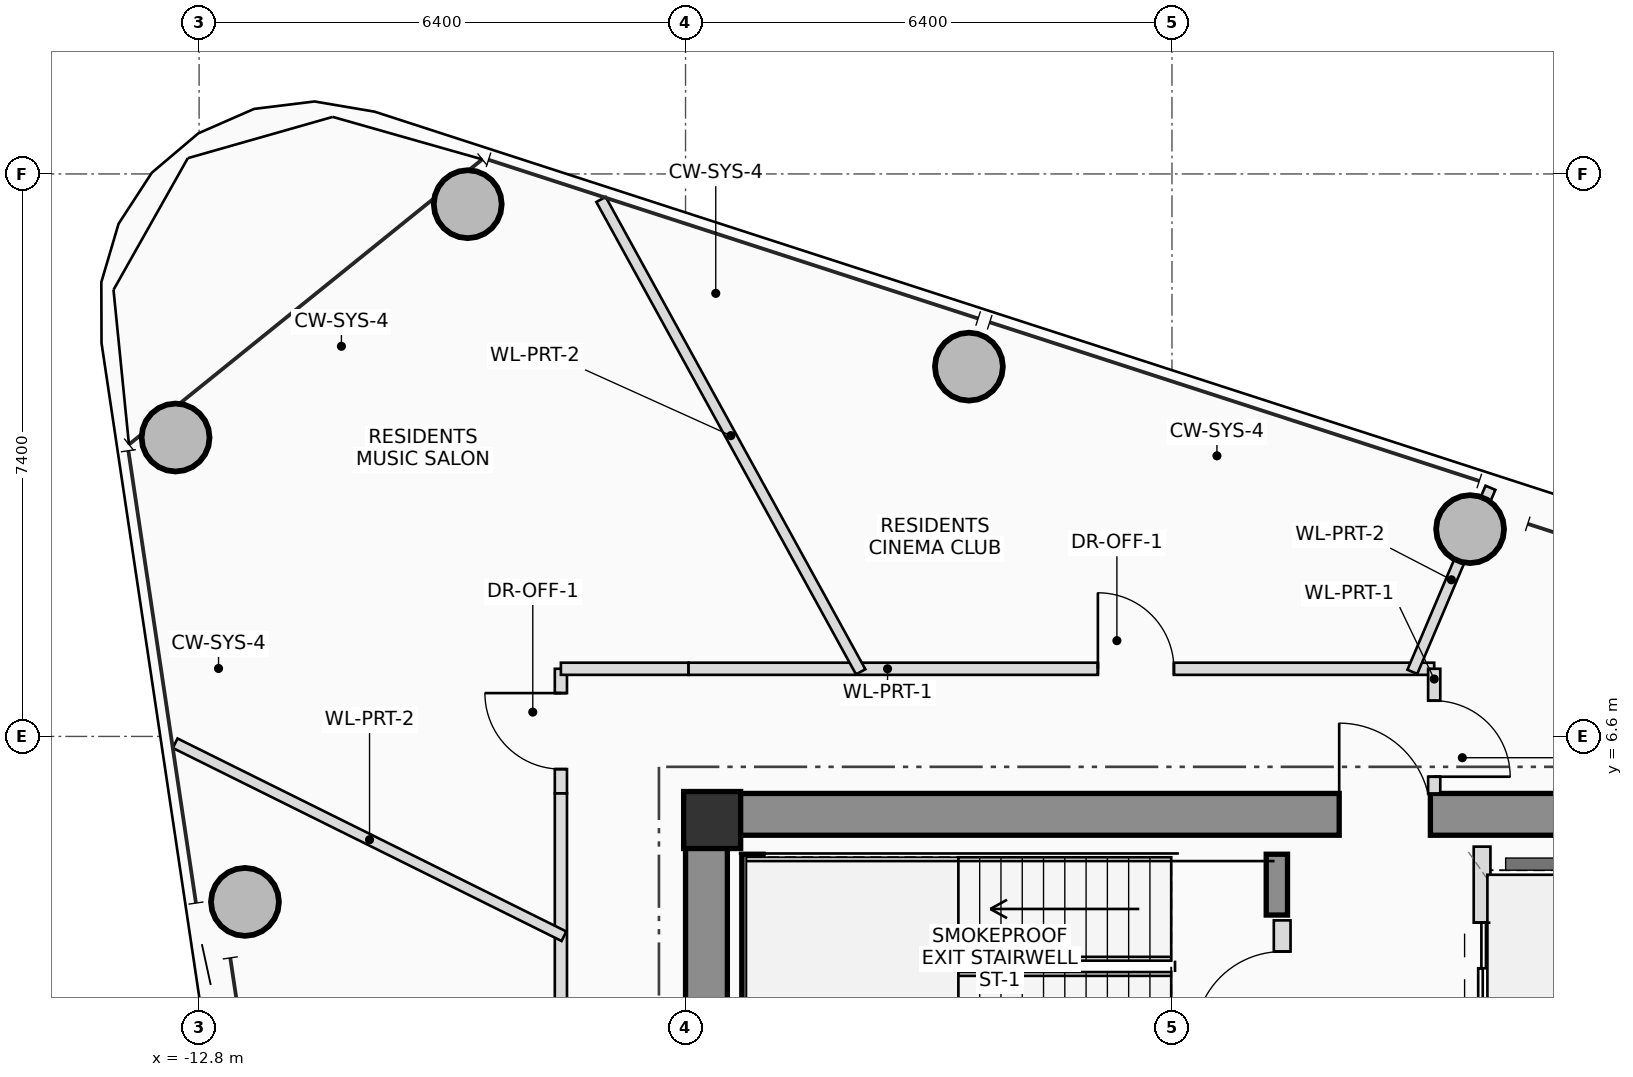
"""IFC4 building model, lengths in metres.
Left out: names, types, materials, properties, quantities, classifications, styles, units other than length and angle.
Written with IfcOpenShell. Run it as: python <this file> out.ifc"""

import sys

from ifc_helpers import new_model, si_unit, direction, frame, frame_2d, origin, origin_2d, place, context, subcontext, project, spatial, rectangle, hollow_circle, extrude, source, transform, mapped, element, fill, save


model = new_model("IFC4")
c1 = context("Model", 3, precision=1e-05, world=origin(), true_north=direction((0.0, 1.0)))
c2 = subcontext(c1, "Body", "Model", "MODEL_VIEW")
j1 = project(units=[si_unit("LENGTHUNIT", "METRE"), si_unit("PLANEANGLEUNIT", "RADIAN")], contexts=[c1])
p1 = place(None, origin())
s1 = spatial("IfcSite", under=j1, at=p1, CompositionType="ELEMENT")
p2 = place(p1, origin())
s2 = spatial("IfcBuilding", under=s1, at=p2, CompositionType="ELEMENT")
p3 = place(p2, frame((0.0, 0.0, 267.75)))
s3 = spatial("IfcBuildingStorey", under=s2, at=p3, CompositionType="ELEMENT", Elevation=267.75)
m1 = source(origin(), c2, "Body", "SweptSolid", [
    extrude(rectangle(XDim=0.75, YDim=0.75, at=origin_2d()), origin(), (0.0, 0.0, 1.0), 3.4),
])
p4 = place(p3, frame((-6.05, 5.5, 0.0), z_axis=(0.0, 0.0, 1.0), x_axis=(1.0, 0.0, 0.0)))
e1 = element("IfcColumn", 1, at=p4, inside=s3, PredefinedType="COLUMN", context=c2, shape_type="MappedRepresentation", body=[
    mapped(m1, transform((0.0, 0.0, 0.0), scale=1.0)),
])
p5 = place(p3, frame((-6.4, 5.575, 0.0), z_axis=(0.0, 0.0, 1.0), x_axis=(1.0, 0.0, 0.0)))
e2 = element("IfcWall", 2, at=p5, inside=s3, PredefinedType="SHEAR", context=c2, shape_type="SweptSolid", body=[
    extrude(rectangle(XDim=12.8, YDim=0.55, at=frame_2d((6.4, 0.0))), origin(), (0.0, 0.0, 1.0), 3.4),
])
p6 = place(p5, frame((8.6, 0.0, 0.0)))
e3 = element("IfcOpeningElement", 3, at=p6, cuts=e2, PredefinedType="OPENING", context=c2, shape_type="SweptSolid", body=[
    extrude(rectangle(XDim=1.2, YDim=2.2, at=frame_2d((0.6, 1.1))), frame((0.0, 0.285, 0.0), z_axis=(0.0, -1.0, 0.0), x_axis=(1.0, 0.0, 0.0)), (0.0, 0.0, 1.0), 0.57),
])
p7 = place(p3, frame((-6.125, 1.75, 0.0), z_axis=(0.0, 0.0, 1.0), x_axis=(0.0, 1.0, 0.0)))
e4 = element("IfcWall", 4, at=p7, inside=s3, PredefinedType="SHEAR", context=c2, shape_type="SweptSolid", body=[
    extrude(rectangle(XDim=3.55, YDim=0.55, at=frame_2d((1.775, 0.0))), origin(), (0.0, 0.0, 1.0), 3.4),
])
p8 = place(p3, frame((-5.52, 2.3, 0.0), z_axis=(0.0, 0.0, 1.0), x_axis=(0.0, 1.0, 0.0)))
e5 = element("IfcWall", 5, at=p8, inside=s3, PredefinedType="SHEAR", context=c2, shape_type="SweptSolid", body=[
    extrude(rectangle(XDim=2.75, YDim=0.28, at=frame_2d((1.375, 0.0))), origin(), (0.0, 0.0, 1.0), 3.4),
])
p9 = place(p3, frame((1.38, 4.25, 0.0), z_axis=(0.0, 0.0, 1.0), x_axis=(0.0, 1.0, 0.0)))
e6 = element("IfcWall", 6, at=p9, inside=s3, PredefinedType="SHEAR", context=c2, shape_type="SweptSolid", body=[
    extrude(rectangle(XDim=0.8, YDim=0.28, at=frame_2d((0.4, 0.0))), origin(), (0.0, 0.0, 1.0), 3.4),
])
m2 = source(origin(), c2, "Body", "SweptSolid", [
    extrude(hollow_circle(Radius=0.45, WallThickness=0.032, at=origin_2d()), origin(), (0.0, 0.0, 1.0), 3.4),
])
for number, where, z_axis, x_axis in (
    (7, (3.922, 9.327, 0.0), (0.0, 0.0, 1.0), (1.0, 0.0, 0.0)),
    (8, (-2.672, 11.465, 0.0), (0.0, 0.0, 1.0), (1.0, 0.0, 0.0)),
    (9, (-9.266, 13.602, 0.0), (0.0, 0.0, 1.0), (1.0, 0.0, 0.0)),
    (10, (-13.11, 10.532, 0.0), (0.0, 0.0, 1.0), (1.0, 0.0, 0.0)),
    (11, (-12.197, 4.423, 0.0), (0.0, 0.0, 1.0), (1.0, 0.0, 0.0)),
):
    element("IfcColumn", number, at=place(p3, frame(where, z_axis=z_axis, x_axis=x_axis)), inside=s3, PredefinedType="COLUMN", context=c2, shape_type="MappedRepresentation", body=[
        mapped(m2, transform((0.0, 0.0, 0.0), scale=1.0)),
    ])
p10 = place(p3, frame((1.45, 2.2, 0.0), z_axis=(0.0, 0.0, 1.0), x_axis=(0.0, 1.0, 0.0)))
e12 = element("IfcWall", 12, at=p10, inside=s3, PredefinedType="PLUMBINGWALL", context=c2, shape_type="SweptSolid", body=[
    extrude(rectangle(XDim=1.98, YDim=0.22, at=frame_2d((0.99, 0.0))), origin(), (0.0, 0.0, 1.0), 3.2),
])
p11 = place(p10, frame((0.42, 0.0, 0.0)))
e13 = element("IfcOpeningElement", 13, at=p11, cuts=e12, PredefinedType="OPENING", context=c2, shape_type="SweptSolid", body=[
    extrude(rectangle(XDim=1.15, YDim=2.15, at=frame_2d((0.575, 1.075))), frame((0.0, 0.12, 0.0), z_axis=(0.0, -1.0, 0.0), x_axis=(1.0, 0.0, 0.0)), (0.0, 0.0, 1.0), 0.24),
])
p12 = place(p3, frame((4.08, 2.2, 0.0), z_axis=(0.0, 0.0, 1.0), x_axis=(0.0, 1.0, 0.0)))
e14 = element("IfcWall", 14, at=p12, inside=s3, PredefinedType="PLUMBINGWALL", context=c2, shape_type="SweptSolid", body=[
    extrude(rectangle(XDim=2.95, YDim=0.22, at=frame_2d((1.475, 0.0))), origin(), (0.0, 0.0, 1.0), 3.2),
])
p13 = place(p12, frame((0.75, 0.0, 0.0)))
e15 = element("IfcOpeningElement", 15, at=p13, cuts=e14, PredefinedType="OPENING", context=c2, shape_type="SweptSolid", body=[
    extrude(rectangle(XDim=1.2, YDim=2.25, at=frame_2d((0.6, 1.125))), frame((0.0, 0.12, 0.0), z_axis=(0.0, -1.0, 0.0), x_axis=(1.0, 0.0, 0.0)), (0.0, 0.0, 1.0), 0.24),
])
p14 = place(p3, frame((-8.04, 5.85, 0.0), z_axis=(0.0, 0.0, 1.0), x_axis=(0.0, 1.0, 0.0)))
e16 = element("IfcWall", 16, at=p14, inside=s3, PredefinedType="PARTITIONING", context=c2, shape_type="SweptSolid", body=[
    extrude(rectangle(XDim=1.64, YDim=0.16, at=frame_2d((0.82, 0.0))), origin(), (0.0, 0.0, 1.0), 2.605),
])
p15 = place(p14, frame((0.32, 0.0, 0.0)))
e17 = element("IfcOpeningElement", 17, at=p15, cuts=e16, PredefinedType="OPENING", context=c2, shape_type="SweptSolid", body=[
    extrude(rectangle(XDim=1.0, YDim=2.25, at=frame_2d((0.5, 1.125))), frame((0.0, 0.09, 0.0), z_axis=(0.0, -1.0, 0.0), x_axis=(1.0, 0.0, 0.0)), (0.0, 0.0, 1.0), 0.18),
])
p16 = place(p3, frame((-8.04, 7.49, 0.0), z_axis=(0.0, 0.0, 1.0), x_axis=(1.0, 0.0, 0.0)))
e18 = element("IfcWall", 18, at=p16, inside=s3, PredefinedType="PARTITIONING", context=c2, shape_type="SweptSolid", body=[
    extrude(rectangle(XDim=1.68, YDim=0.16, at=frame_2d((0.84, 0.0))), origin(), (0.0, 0.0, 1.0), 2.605),
])
p17 = place(p3, frame((-6.36, 7.49, 0.0), z_axis=(0.0, 0.0, 1.0), x_axis=(1.0, 0.0, 0.0)))
e19 = element("IfcWall", 19, at=p17, inside=s3, PredefinedType="PARTITIONING", context=c2, shape_type="SweptSolid", body=[
    extrude(rectangle(XDim=9.81, YDim=0.16, at=frame_2d((4.905, 0.0))), origin(), (0.0, 0.0, 1.0), 2.605),
])
p18 = place(p17, frame((5.385, 0.0, 0.0)))
e20 = element("IfcOpeningElement", 20, at=p18, cuts=e19, PredefinedType="OPENING", context=c2, shape_type="SweptSolid", body=[
    extrude(rectangle(XDim=1.0, YDim=2.25, at=frame_2d((0.5, 1.125))), frame((0.0, 0.09, 0.0), z_axis=(0.0, -1.0, 0.0), x_axis=(1.0, 0.0, 0.0)), (0.0, 0.0, 1.0), 0.18),
])
p19 = place(p3, frame((3.45, 7.49, 0.0), z_axis=(0.0, 0.0, 1.0), x_axis=(0.0, -1.0, 0.0)))
e21 = element("IfcWall", 21, at=p19, inside=s3, PredefinedType="PARTITIONING", context=c2, shape_type="SweptSolid", body=[
    extrude(rectangle(XDim=1.64, YDim=0.16, at=frame_2d((0.82, 0.0))), origin(), (0.0, 0.0, 1.0), 2.805),
])
p20 = place(p19, frame((0.42, 0.0, 0.0)))
e22 = element("IfcOpeningElement", 22, at=p20, cuts=e21, PredefinedType="OPENING", context=c2, shape_type="SweptSolid", body=[
    extrude(rectangle(XDim=1.0, YDim=2.25, at=frame_2d((0.5, 1.125))), frame((0.0, 0.09, 0.0), z_axis=(0.0, -1.0, 0.0), x_axis=(1.0, 0.0, 0.0)), (0.0, 0.0, 1.0), 0.18),
])
p21 = place(p3, frame((-8.04, -5.85, 0.0), z_axis=(0.0, 0.0, 1.0), x_axis=(0.0, 1.0, 0.0)))
e23 = element("IfcWall", 23, at=p21, inside=s3, PredefinedType="PARTITIONING", context=c2, shape_type="SweptSolid", body=[
    extrude(rectangle(XDim=11.7, YDim=0.16, at=frame_2d((5.85, 0.0))), origin(), (0.0, 0.0, 1.0), 2.605),
])
p22 = place(p21, frame((5.855, 0.0, 0.0)))
e24 = element("IfcOpeningElement", 24, at=p22, cuts=e23, PredefinedType="OPENING", context=c2, shape_type="SweptSolid", body=[
    extrude(rectangle(XDim=1.0, YDim=2.25, at=frame_2d((0.5, 1.125))), frame((0.0, 0.09, 0.0), z_axis=(0.0, -1.0, 0.0), x_axis=(1.0, 0.0, 0.0)), (0.0, 0.0, 1.0), 0.18),
])
p23 = place(p3, frame((3.162, 7.45, 0.0), z_axis=(0.0, 0.0, 1.0), x_axis=(0.390769134848, 0.920488719784, 0.0)))
e25 = element("IfcWall", 25, at=p23, inside=s3, PredefinedType="PARTITIONING", context=c2, shape_type="SweptSolid", body=[
    extrude(rectangle(XDim=2.63, YDim=0.14, at=frame_2d((1.315, 0.0))), origin(), (0.0, 0.0, 1.0), 2.805),
])
p24 = place(p3, frame((-4.096, 7.45, 0.0), z_axis=(0.0, 0.0, 1.0), x_axis=(-0.481753550604, 0.876306747937, 0.0)))
e26 = element("IfcWall", 26, at=p24, inside=s3, PredefinedType="PARTITIONING", context=c2, shape_type="SweptSolid", body=[
    extrude(rectangle(XDim=7.092, YDim=0.14, at=frame_2d((3.546, 0.0))), origin(), (0.0, 0.0, 1.0), 2.605),
])
p25 = place(p3, frame((-8.0, 3.971, 0.0), z_axis=(0.0, 0.0, 1.0), x_axis=(-0.895714476241, 0.444629707793, 0.0)))
e27 = element("IfcWall", 27, at=p25, inside=s3, PredefinedType="PARTITIONING", context=c2, shape_type="SweptSolid", body=[
    extrude(rectangle(XDim=5.711, YDim=0.14, at=frame_2d((2.855, 0.0))), origin(), (0.0, 0.0, 1.0), 2.605),
])
p26 = place(p6, origin())
e28 = element("IfcDoor", 28, at=p26, inside=s3, OperationType="SINGLE_SWING_LEFT", PredefinedType="DOOR", context=c2, shape_type="SweptSolid", body=[
    extrude(rectangle(XDim=1.2, YDim=2.2, at=frame_2d((0.6, 1.1))), frame((0.0, 0.025, 0.0), z_axis=(0.0, -1.0, 0.0), x_axis=(1.0, 0.0, 0.0)), (0.0, 0.0, 1.0), 0.05),
])
fill(e3, e28)
p27 = place(p11, origin())
e29 = element("IfcDoor", 29, at=p27, inside=s3, OperationType="SINGLE_SWING_LEFT", PredefinedType="DOOR", context=c2, shape_type="SweptSolid", body=[
    extrude(rectangle(XDim=1.15, YDim=2.15, at=frame_2d((0.575, 1.075))), frame((0.0, 0.025, 0.0), z_axis=(0.0, -1.0, 0.0), x_axis=(1.0, 0.0, 0.0)), (0.0, 0.0, 1.0), 0.05),
])
fill(e13, e29)
p28 = place(p13, origin())
e30 = element("IfcDoor", 30, at=p28, inside=s3, OperationType="DOUBLE_DOOR_SLIDING", PredefinedType="DOOR", context=c2, shape_type="SweptSolid", body=[
    extrude(rectangle(XDim=1.2, YDim=2.25, at=frame_2d((0.6, 1.125))), frame((0.0, 0.025, 0.0), z_axis=(0.0, -1.0, 0.0), x_axis=(1.0, 0.0, 0.0)), (0.0, 0.0, 1.0), 0.05),
])
fill(e15, e30)
p29 = place(p15, origin())
e31 = element("IfcDoor", 31, at=p29, inside=s3, OperationType="SINGLE_SWING_RIGHT", PredefinedType="DOOR", context=c2, shape_type="SweptSolid", body=[
    extrude(rectangle(XDim=1.0, YDim=2.25, at=frame_2d((0.5, 1.125))), frame((0.0, 0.025, 0.0), z_axis=(0.0, -1.0, 0.0), x_axis=(1.0, 0.0, 0.0)), (0.0, 0.0, 1.0), 0.05),
])
fill(e17, e31)
p30 = place(p18, origin())
e32 = element("IfcDoor", 32, at=p30, inside=s3, OperationType="SINGLE_SWING_LEFT", PredefinedType="DOOR", context=c2, shape_type="SweptSolid", body=[
    extrude(rectangle(XDim=1.0, YDim=2.25, at=frame_2d((0.5, 1.125))), frame((0.0, 0.025, 0.0), z_axis=(0.0, -1.0, 0.0), x_axis=(1.0, 0.0, 0.0)), (0.0, 0.0, 1.0), 0.05),
])
fill(e20, e32)
p31 = place(p20, origin())
e33 = element("IfcDoor", 33, at=p31, inside=s3, OperationType="SINGLE_SWING_RIGHT", PredefinedType="DOOR", context=c2, shape_type="SweptSolid", body=[
    extrude(rectangle(XDim=1.0, YDim=2.25, at=frame_2d((0.5, 1.125))), frame((0.0, 0.025, 0.0), z_axis=(0.0, -1.0, 0.0), x_axis=(1.0, 0.0, 0.0)), (0.0, 0.0, 1.0), 0.05),
])
fill(e22, e33)
save(model, sys.argv[1])
